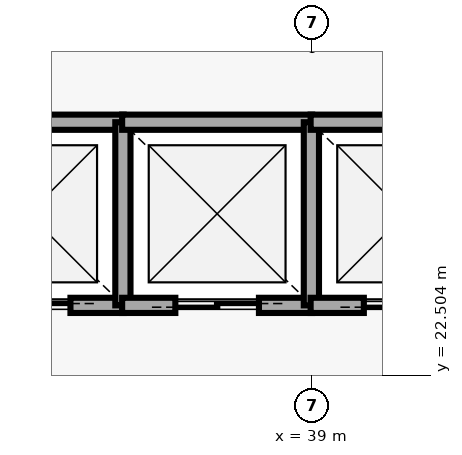
"""IFC4 building model, lengths in metres.
Left out: names, types, materials, properties, quantities, classifications, styles, units other than length and angle.
Written with IfcOpenShell. Run it as: python <this file> out.ifc"""

import sys

from ifc_helpers import new_model, si_unit, direction, frame, frame_2d, origin, place, context, subcontext, project, spatial, rectangle, extrude, element, fill, save


model = new_model("IFC4")
c1 = context("Model", 3, precision=1e-05, world=origin(), true_north=direction((0.0, 1.0)))
c2 = subcontext(c1, "Body", "Model", "MODEL_VIEW")
j1 = project(units=[si_unit("LENGTHUNIT", "METRE"), si_unit("PLANEANGLEUNIT", "RADIAN")], contexts=[c1])
p1 = place(None, origin())
s1 = spatial("IfcSite", under=j1, at=p1, CompositionType="ELEMENT")
p2 = place(p1, origin())
s2 = spatial("IfcBuilding", under=s1, at=p2, CompositionType="ELEMENT")
p3 = place(p2, frame((0.0, 0.0, 113.25)))
s3 = spatial("IfcBuildingStorey", under=s2, at=p3, CompositionType="ELEMENT", Elevation=113.25)
p4 = place(p3, frame((34.02, 23.42, 0.0), z_axis=(0.0, 0.0, 1.0), x_axis=(1.0, 0.0, 0.0)))
e1 = element("IfcWall", 1, at=p4, inside=s3, PredefinedType="SOLIDWALL", context=c2, shape_type="SweptSolid", body=[
    extrude(rectangle(XDim=2.5, YDim=0.2, at=frame_2d((1.25, 0.0))), origin(), (0.0, 0.0, 1.0), 4.75),
])
p5 = place(p4, frame((0.7, 0.0, 0.0)))
e2 = element("IfcOpeningElement", 2, at=p5, cuts=e1, PredefinedType="OPENING", context=c2, shape_type="SweptSolid", body=[
    extrude(rectangle(XDim=1.1, YDim=2.15, at=frame_2d((0.55, 1.075))), frame((0.0, 0.11, 0.0), z_axis=(0.0, -1.0, 0.0), x_axis=(1.0, 0.0, 0.0)), (0.0, 0.0, 1.0), 0.22),
])
p6 = place(p3, frame((34.02, 25.83, 0.0), z_axis=(0.0, 0.0, 1.0), x_axis=(1.0, 0.0, 0.0)))
e3 = element("IfcWall", 3, at=p6, inside=s3, PredefinedType="SOLIDWALL", context=c2, shape_type="SweptSolid", body=[
    extrude(rectangle(XDim=2.5, YDim=0.2, at=frame_2d((1.25, 0.0))), origin(), (0.0, 0.0, 1.0), 4.75),
])
p7 = place(p3, frame((36.51, 23.42, 0.0), z_axis=(0.0, 0.0, 1.0), x_axis=(0.0, 1.0, 0.0)))
e4 = element("IfcWall", 4, at=p7, inside=s3, PredefinedType="SOLIDWALL", context=c2, shape_type="SweptSolid", body=[
    extrude(rectangle(XDim=2.41, YDim=0.2, at=frame_2d((1.205, 0.0))), origin(), (0.0, 0.0, 1.0), 4.75),
])
p8 = place(p3, frame((36.5, 23.42, 0.0), z_axis=(0.0, 0.0, 1.0), x_axis=(1.0, 0.0, 0.0)))
e5 = element("IfcWall", 5, at=p8, inside=s3, PredefinedType="SOLIDWALL", context=c2, shape_type="SweptSolid", body=[
    extrude(rectangle(XDim=2.5, YDim=0.2, at=frame_2d((1.25, 0.0))), origin(), (0.0, 0.0, 1.0), 4.75),
])
p9 = place(p8, frame((0.7, 0.0, 0.0)))
e6 = element("IfcOpeningElement", 6, at=p9, cuts=e5, PredefinedType="OPENING", context=c2, shape_type="SweptSolid", body=[
    extrude(rectangle(XDim=1.1, YDim=2.15, at=frame_2d((0.55, 1.075))), frame((0.0, 0.11, 0.0), z_axis=(0.0, -1.0, 0.0), x_axis=(1.0, 0.0, 0.0)), (0.0, 0.0, 1.0), 0.22),
])
p10 = place(p3, frame((36.5, 25.83, 0.0), z_axis=(0.0, 0.0, 1.0), x_axis=(1.0, 0.0, 0.0)))
e7 = element("IfcWall", 7, at=p10, inside=s3, PredefinedType="SOLIDWALL", context=c2, shape_type="SweptSolid", body=[
    extrude(rectangle(XDim=2.5, YDim=0.2, at=frame_2d((1.25, 0.0))), origin(), (0.0, 0.0, 1.0), 4.75),
])
p11 = place(p3, frame((38.99, 23.42, 0.0), z_axis=(0.0, 0.0, 1.0), x_axis=(0.0, 1.0, 0.0)))
e8 = element("IfcWall", 8, at=p11, inside=s3, PredefinedType="SOLIDWALL", context=c2, shape_type="SweptSolid", body=[
    extrude(rectangle(XDim=2.41, YDim=0.2, at=frame_2d((1.205, 0.0))), origin(), (0.0, 0.0, 1.0), 4.75),
])
p12 = place(p3, frame((38.98, 23.42, 0.0), z_axis=(0.0, 0.0, 1.0), x_axis=(1.0, 0.0, 0.0)))
e9 = element("IfcWall", 9, at=p12, inside=s3, PredefinedType="SOLIDWALL", context=c2, shape_type="SweptSolid", body=[
    extrude(rectangle(XDim=2.5, YDim=0.2, at=frame_2d((1.25, 0.0))), origin(), (0.0, 0.0, 1.0), 4.75),
])
p13 = place(p12, frame((0.7, 0.0, 0.0)))
e10 = element("IfcOpeningElement", 10, at=p13, cuts=e9, PredefinedType="OPENING", context=c2, shape_type="SweptSolid", body=[
    extrude(rectangle(XDim=1.1, YDim=2.15, at=frame_2d((0.55, 1.075))), frame((0.0, 0.11, 0.0), z_axis=(0.0, -1.0, 0.0), x_axis=(1.0, 0.0, 0.0)), (0.0, 0.0, 1.0), 0.22),
])
p14 = place(p3, frame((38.98, 25.83, 0.0), z_axis=(0.0, 0.0, 1.0), x_axis=(1.0, 0.0, 0.0)))
e11 = element("IfcWall", 11, at=p14, inside=s3, PredefinedType="SOLIDWALL", context=c2, shape_type="SweptSolid", body=[
    extrude(rectangle(XDim=2.5, YDim=0.2, at=frame_2d((1.25, 0.0))), origin(), (0.0, 0.0, 1.0), 4.75),
])
p15 = place(p5, origin())
e12 = element("IfcDoor", 12, at=p15, inside=s3, OperationType="DOUBLE_DOOR_SLIDING", PredefinedType="DOOR", context=c2, shape_type="SweptSolid", body=[
    extrude(rectangle(XDim=1.1, YDim=2.15, at=frame_2d((0.55, 1.075))), frame((0.0, 0.025, 0.0), z_axis=(0.0, -1.0, 0.0), x_axis=(1.0, 0.0, 0.0)), (0.0, 0.0, 1.0), 0.05),
])
fill(e2, e12)
p16 = place(p9, origin())
e13 = element("IfcDoor", 13, at=p16, inside=s3, OperationType="DOUBLE_DOOR_SLIDING", PredefinedType="DOOR", context=c2, shape_type="SweptSolid", body=[
    extrude(rectangle(XDim=1.1, YDim=2.15, at=frame_2d((0.55, 1.075))), frame((0.0, 0.025, 0.0), z_axis=(0.0, -1.0, 0.0), x_axis=(1.0, 0.0, 0.0)), (0.0, 0.0, 1.0), 0.05),
])
fill(e6, e13)
p17 = place(p13, origin())
e14 = element("IfcDoor", 14, at=p17, inside=s3, OperationType="DOUBLE_DOOR_SLIDING", PredefinedType="DOOR", context=c2, shape_type="SweptSolid", body=[
    extrude(rectangle(XDim=1.1, YDim=2.15, at=frame_2d((0.55, 1.075))), frame((0.0, 0.025, 0.0), z_axis=(0.0, -1.0, 0.0), x_axis=(1.0, 0.0, 0.0)), (0.0, 0.0, 1.0), 0.05),
])
fill(e10, e14)
save(model, sys.argv[1])
